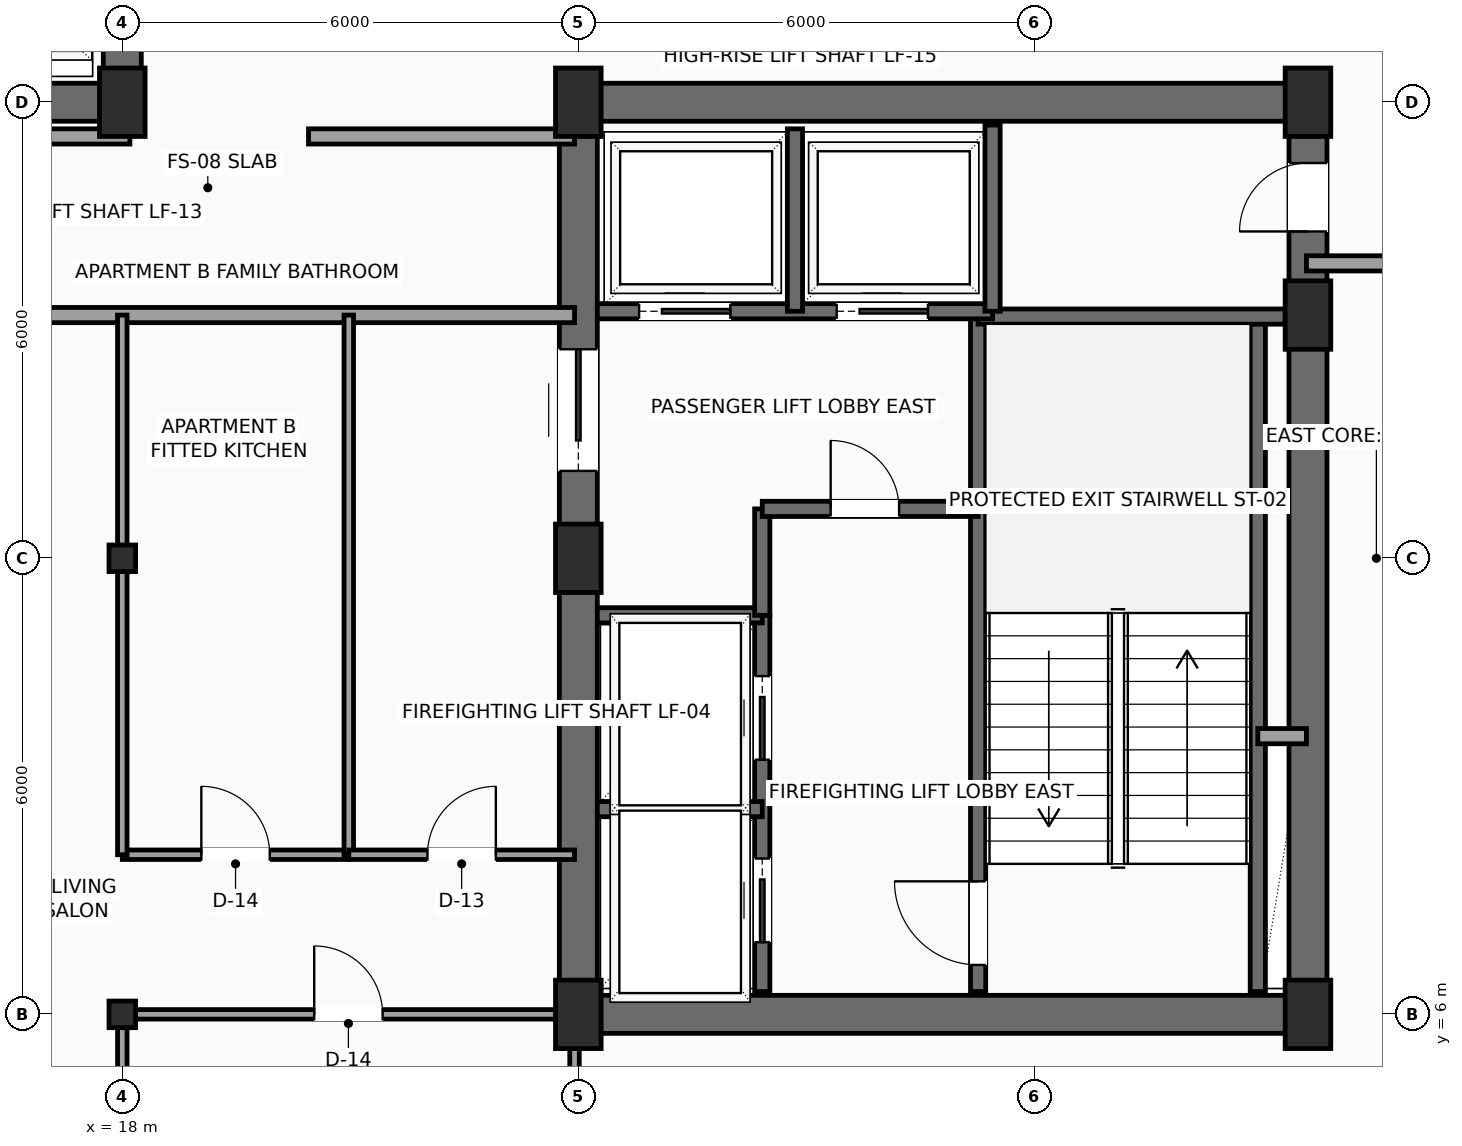
"""IFC4 building model, lengths in metres.
Left out: names, types, materials, properties, quantities, classifications, styles, units other than length and angle.
Written with IfcOpenShell. Run it as: python <this file> out.ifc"""

import sys

from ifc_helpers import new_model, si_unit, direction, frame, frame_2d, origin, origin_2d, place, context, subcontext, project, spatial, rectangle, hollow_rectangle, extrude, element, fill, save


model = new_model("IFC4")
c1 = context("Model", 3, precision=1e-05, world=origin(), true_north=direction((0.0, 1.0)))
c2 = subcontext(c1, "Body", "Model", "MODEL_VIEW")
j1 = project(units=[si_unit("LENGTHUNIT", "METRE"), si_unit("PLANEANGLEUNIT", "RADIAN")], contexts=[c1])
p1 = place(None, origin())
s1 = spatial("IfcSite", under=j1, at=p1, CompositionType="ELEMENT")
p2 = place(p1, origin())
s2 = spatial("IfcBuilding", under=s1, at=p2, CompositionType="ELEMENT")
p3 = place(p2, frame((0.0, 0.0, 257.2)))
s3 = spatial("IfcBuildingStorey", under=s2, at=p3, CompositionType="ELEMENT", Elevation=257.2)
for number, where, z_axis, x_axis in (
    (1, (18.0, 18.0, 0.0), (0.0, 0.0, 1.0), (1.0, 0.0, 0.0)),
    (2, (24.0, 6.0, 0.0), (0.0, 0.0, 1.0), (1.0, 0.0, 0.0)),
    (3, (24.0, 12.0, 0.0), (0.0, 0.0, 1.0), (1.0, 0.0, 0.0)),
    (4, (24.0, 18.0, 0.0), (0.0, 0.0, 1.0), (1.0, 0.0, 0.0)),
    (5, (33.6, 6.0, 0.0), (0.0, 0.0, 1.0), (1.0, 0.0, 0.0)),
    (6, (33.6, 15.2, 0.0), (0.0, 0.0, 1.0), (1.0, 0.0, 0.0)),
    (7, (33.6, 18.0, 0.0), (0.0, 0.0, 1.0), (1.0, 0.0, 0.0)),
):
    element("IfcColumn", number, at=place(p3, frame(where, z_axis=z_axis, x_axis=x_axis)), inside=s3, PredefinedType="COLUMN", context=c2, shape_type="SweptSolid", body=[
        extrude(rectangle(XDim=0.6, YDim=0.9, at=origin_2d()), origin(), (0.0, 0.0, 1.0), 3.5),
    ])
for number, where, z_axis, x_axis in (
    (8, (18.0, 6.0, 0.0), (0.0, 0.0, 1.0), (1.0, 0.0, 0.0)),
    (9, (18.0, 12.0, 0.0), (0.0, 0.0, 1.0), (1.0, 0.0, 0.0)),
):
    element("IfcColumn", number, at=place(p3, frame(where, z_axis=z_axis, x_axis=x_axis)), inside=s3, PredefinedType="COLUMN", context=c2, shape_type="SweptSolid", body=[
        extrude(hollow_rectangle(XDim=0.35, YDim=0.35, WallThickness=0.016, InnerFilletRadius=0.016, OuterFilletRadius=0.032, at=origin_2d()), origin(), (0.0, 0.0, 1.0), 3.5),
    ])
p4 = place(p3, frame((6.0, 18.0, 0.0), z_axis=(0.0, 0.0, 1.0), x_axis=(1.0, 0.0, 0.0)))
e10 = element("IfcWall", 10, at=p4, inside=s3, PredefinedType="SHEAR", context=c2, shape_type="SweptSolid", body=[
    extrude(rectangle(XDim=12.0, YDim=0.5, at=frame_2d((6.0, 0.0))), origin(), (0.0, 0.0, 1.0), 3.3),
])
p5 = place(p4, frame((7.15, 0.0, 0.0)))
e11 = element("IfcOpeningElement", 11, at=p5, cuts=e10, PredefinedType="OPENING", context=c2, shape_type="SweptSolid", body=[
    extrude(rectangle(XDim=1.6, YDim=2.3, at=frame_2d((0.8, 1.15))), frame((0.0, 0.26, 0.0), z_axis=(0.0, -1.0, 0.0), x_axis=(1.0, 0.0, 0.0)), (0.0, 0.0, 1.0), 0.52),
])
for number, where, z_axis, x_axis in (
    (12, (18.0, 18.0, 0.0), (0.0, 0.0, 1.0), (0.0, 1.0, 0.0)),
    (13, (24.0, 6.0, 0.0), (0.0, 0.0, 1.0), (1.0, 0.0, 0.0)),
    (14, (24.0, 18.0, 0.0), (0.0, 0.0, 1.0), (1.0, 0.0, 0.0)),
):
    element("IfcWall", number, at=place(p3, frame(where, z_axis=z_axis, x_axis=x_axis)), inside=s3, PredefinedType="SHEAR", context=c2, shape_type="SweptSolid", body=[
        extrude(rectangle(XDim=9.6, YDim=0.5, at=frame_2d((4.8, 0.0))), origin(), (0.0, 0.0, 1.0), 3.3),
    ])
p6 = place(p3, frame((24.0, 6.0, 0.0), z_axis=(0.0, 0.0, 1.0), x_axis=(0.0, 1.0, 0.0)))
e15 = element("IfcWall", 15, at=p6, inside=s3, PredefinedType="SHEAR", context=c2, shape_type="SweptSolid", body=[
    extrude(rectangle(XDim=12.0, YDim=0.5, at=frame_2d((6.0, 0.0))), origin(), (0.0, 0.0, 1.0), 3.3),
])
p7 = place(p6, frame((7.15, 0.0, 0.0)))
e16 = element("IfcOpeningElement", 16, at=p7, cuts=e15, PredefinedType="OPENING", context=c2, shape_type="SweptSolid", body=[
    extrude(rectangle(XDim=1.6, YDim=2.3, at=frame_2d((0.8, 1.15))), frame((0.0, 0.26, 0.0), z_axis=(0.0, -1.0, 0.0), x_axis=(1.0, 0.0, 0.0)), (0.0, 0.0, 1.0), 0.52),
])
p8 = place(p3, frame((33.6, 6.0, 0.0), z_axis=(0.0, 0.0, 1.0), x_axis=(0.0, 1.0, 0.0)))
e17 = element("IfcWall", 17, at=p8, inside=s3, PredefinedType="SHEAR", context=c2, shape_type="SweptSolid", body=[
    extrude(rectangle(XDim=12.0, YDim=0.5, at=frame_2d((6.0, 0.0))), origin(), (0.0, 0.0, 1.0), 3.3),
])
p9 = place(p8, frame((10.3, 0.0, 0.0)))
e18 = element("IfcOpeningElement", 18, at=p9, cuts=e17, PredefinedType="OPENING", context=c2, shape_type="SweptSolid", body=[
    extrude(rectangle(XDim=0.9, YDim=2.15, at=frame_2d((0.45, 1.075))), frame((0.0, 0.26, 0.0), z_axis=(0.0, -1.0, 0.0), x_axis=(1.0, 0.0, 0.0)), (0.0, 0.0, 1.0), 0.52),
])
p10 = place(p3, frame((29.26, 6.3, 0.0), z_axis=(0.0, 0.0, 1.0), x_axis=(0.0, 1.0, 0.0)))
e19 = element("IfcWall", 19, at=p10, inside=s3, PredefinedType="SHEAR", context=c2, shape_type="SweptSolid", body=[
    extrude(rectangle(XDim=8.88, YDim=0.2, at=frame_2d((4.44, 0.0))), origin(), (0.0, 0.0, 1.0), 3.3),
])
p11 = place(p10, frame((0.35, 0.0, 0.0)))
e20 = element("IfcOpeningElement", 20, at=p11, cuts=e19, PredefinedType="OPENING", context=c2, shape_type="SweptSolid", body=[
    extrude(rectangle(XDim=1.1, YDim=2.2, at=frame_2d((0.55, 1.1))), frame((0.0, 0.11, 0.0), z_axis=(0.0, -1.0, 0.0), x_axis=(1.0, 0.0, 0.0)), (0.0, 0.0, 1.0), 0.22),
])
p12 = place(p3, frame((32.94, 6.3, 0.0), z_axis=(0.0, 0.0, 1.0), x_axis=(0.0, 1.0, 0.0)))
e21 = element("IfcWall", 21, at=p12, inside=s3, PredefinedType="SHEAR", context=c2, shape_type="SweptSolid", body=[
    extrude(rectangle(XDim=8.88, YDim=0.2, at=frame_2d((4.44, 0.0))), origin(), (0.0, 0.0, 1.0), 3.3),
])
p13 = place(p3, frame((29.26, 15.18, 0.0), z_axis=(0.0, 0.0, 1.0), x_axis=(1.0, 0.0, 0.0)))
e22 = element("IfcWall", 22, at=p13, inside=s3, PredefinedType="SHEAR", context=c2, shape_type="SweptSolid", body=[
    extrude(rectangle(XDim=4.04, YDim=0.2, at=frame_2d((2.02, 0.0))), origin(), (0.0, 0.0, 1.0), 3.3),
])
p14 = place(p3, frame((26.42, 6.3, 0.0), z_axis=(0.0, 0.0, 1.0), x_axis=(0.0, 1.0, 0.0)))
e23 = element("IfcWall", 23, at=p14, inside=s3, PredefinedType="SHEAR", context=c2, shape_type="SweptSolid", body=[
    extrude(rectangle(XDim=4.95, YDim=0.2, at=frame_2d((2.475, 0.0))), origin(), (0.0, 0.0, 1.0), 3.3),
])
p15 = place(p14, frame((0.65, 0.0, 0.0)))
e24 = element("IfcOpeningElement", 24, at=p15, cuts=e23, PredefinedType="OPENING", context=c2, shape_type="SweptSolid", body=[
    extrude(rectangle(XDim=1.1, YDim=2.2, at=frame_2d((0.55, 1.1))), frame((0.0, 0.11, 0.0), z_axis=(0.0, -1.0, 0.0), x_axis=(1.0, 0.0, 0.0)), (0.0, 0.0, 1.0), 0.22),
])
p16 = place(p14, frame((3.05, 0.0, 0.0)))
e25 = element("IfcOpeningElement", 25, at=p16, cuts=e23, PredefinedType="OPENING", context=c2, shape_type="SweptSolid", body=[
    extrude(rectangle(XDim=1.1, YDim=2.2, at=frame_2d((0.55, 1.1))), frame((0.0, 0.11, 0.0), z_axis=(0.0, -1.0, 0.0), x_axis=(1.0, 0.0, 0.0)), (0.0, 0.0, 1.0), 0.22),
])
for number, where, z_axis, x_axis in (
    (26, (24.25, 8.7, 0.0), (0.0, 0.0, 1.0), (1.0, 0.0, 0.0)),
    (27, (24.25, 11.25, 0.0), (0.0, 0.0, 1.0), (1.0, 0.0, 0.0)),
):
    element("IfcWall", number, at=place(p3, frame(where, z_axis=z_axis, x_axis=x_axis)), inside=s3, PredefinedType="SHEAR", context=c2, shape_type="SweptSolid", body=[
        extrude(rectangle(XDim=2.17, YDim=0.2, at=frame_2d((1.085, 0.0))), origin(), (0.0, 0.0, 1.0), 3.3),
    ])
p17 = place(p3, frame((26.42, 11.25, 0.0), z_axis=(0.0, 0.0, 1.0), x_axis=(0.0, 1.0, 0.0)))
e28 = element("IfcWall", 28, at=p17, inside=s3, PredefinedType="SHEAR", context=c2, shape_type="SweptSolid", body=[
    extrude(rectangle(XDim=1.4, YDim=0.2, at=frame_2d((0.7, 0.0))), origin(), (0.0, 0.0, 1.0), 3.3),
])
p18 = place(p3, frame((26.42, 12.65, 0.0), z_axis=(0.0, 0.0, 1.0), x_axis=(1.0, 0.0, 0.0)))
e29 = element("IfcWall", 29, at=p18, inside=s3, PredefinedType="SHEAR", context=c2, shape_type="SweptSolid", body=[
    extrude(rectangle(XDim=2.84, YDim=0.2, at=frame_2d((1.42, 0.0))), origin(), (0.0, 0.0, 1.0), 3.3),
])
p19 = place(p18, frame((0.9, 0.0, 0.0)))
e30 = element("IfcOpeningElement", 30, at=p19, cuts=e29, PredefinedType="OPENING", context=c2, shape_type="SweptSolid", body=[
    extrude(rectangle(XDim=0.9, YDim=2.15, at=frame_2d((0.45, 1.075))), frame((0.0, 0.11, 0.0), z_axis=(0.0, -1.0, 0.0), x_axis=(1.0, 0.0, 0.0)), (0.0, 0.0, 1.0), 0.22),
])
p20 = place(p3, frame((32.94, 9.66, 0.0), z_axis=(0.0, 0.0, 1.0), x_axis=(1.0, 0.0, 0.0)))
e31 = element("IfcWall", 31, at=p20, inside=s3, PredefinedType="SOLIDWALL", context=c2, shape_type="SweptSolid", body=[
    extrude(rectangle(XDim=0.64, YDim=0.2, at=frame_2d((0.32, 0.0))), origin(), (0.0, 0.0, 1.0), 3.3),
])
p21 = place(p3, frame((24.25, 15.25, 0.0), z_axis=(0.0, 0.0, 1.0), x_axis=(1.0, 0.0, 0.0)))
e32 = element("IfcWall", 32, at=p21, inside=s3, PredefinedType="SHEAR", context=c2, shape_type="SweptSolid", body=[
    extrude(rectangle(XDim=5.2, YDim=0.2, at=frame_2d((2.6, 0.0))), origin(), (0.0, 0.0, 1.0), 3.3),
])
p22 = place(p21, frame((0.55, 0.0, 0.0)))
e33 = element("IfcOpeningElement", 33, at=p22, cuts=e32, PredefinedType="OPENING", context=c2, shape_type="SweptSolid", body=[
    extrude(rectangle(XDim=1.2, YDim=2.2, at=frame_2d((0.6, 1.1))), frame((0.0, 0.11, 0.0), z_axis=(0.0, -1.0, 0.0), x_axis=(1.0, 0.0, 0.0)), (0.0, 0.0, 1.0), 0.22),
])
p23 = place(p21, frame((3.15, 0.0, 0.0)))
e34 = element("IfcOpeningElement", 34, at=p23, cuts=e32, PredefinedType="OPENING", context=c2, shape_type="SweptSolid", body=[
    extrude(rectangle(XDim=1.2, YDim=2.2, at=frame_2d((0.6, 1.1))), frame((0.0, 0.11, 0.0), z_axis=(0.0, -1.0, 0.0), x_axis=(1.0, 0.0, 0.0)), (0.0, 0.0, 1.0), 0.22),
])
p24 = place(p3, frame((26.85, 15.25, 0.0), z_axis=(0.0, 0.0, 1.0), x_axis=(0.0, 1.0, 0.0)))
e35 = element("IfcWall", 35, at=p24, inside=s3, PredefinedType="SHEAR", context=c2, shape_type="SweptSolid", body=[
    extrude(rectangle(XDim=2.4, YDim=0.2, at=frame_2d((1.2, 0.0))), origin(), (0.0, 0.0, 1.0), 3.3),
])
p25 = place(p3, frame((29.45, 15.25, 0.0), z_axis=(0.0, 0.0, 1.0), x_axis=(0.0, 1.0, 0.0)))
e36 = element("IfcWall", 36, at=p25, inside=s3, PredefinedType="SHEAR", context=c2, shape_type="SweptSolid", body=[
    extrude(rectangle(XDim=2.45, YDim=0.2, at=frame_2d((1.225, 0.0))), origin(), (0.0, 0.0, 1.0), 3.3),
])
p26 = place(p3, frame((14.95, 17.55, 0.0), z_axis=(0.0, 0.0, 1.0), x_axis=(1.0, 0.0, 0.0)))
e37 = element("IfcWall", 37, at=p26, inside=s3, PredefinedType="SOLIDWALL", context=c2, shape_type="SweptSolid", body=[
    extrude(rectangle(XDim=3.15, YDim=0.2, at=frame_2d((1.575, 0.0))), origin(), (0.0, 0.0, 1.0), 3.3),
])
p27 = place(p3, frame((35.7, 15.88, 0.0), z_axis=(0.0, 0.0, 1.0), x_axis=(-1.0, 0.0, 0.0)))
e38 = element("IfcWall", 38, at=p27, inside=s3, PredefinedType="SOLIDWALL", context=c2, shape_type="SweptSolid", body=[
    extrude(rectangle(XDim=2.12, YDim=0.2, at=frame_2d((1.06, 0.0))), origin(), (0.0, 0.0, 1.0), 3.3),
])
p28 = place(p3, frame((20.45, 17.55, 0.0), z_axis=(0.0, 0.0, 1.0), x_axis=(1.0, 0.0, 0.0)))
e39 = element("IfcWall", 39, at=p28, inside=s3, PredefinedType="SOLIDWALL", context=c2, shape_type="SweptSolid", body=[
    extrude(rectangle(XDim=3.5, YDim=0.2, at=frame_2d((1.75, 0.0))), origin(), (0.0, 0.0, 1.0), 3.3),
])
p29 = place(p3, frame((23.95, 15.2, 0.0), z_axis=(0.0, 0.0, 1.0), x_axis=(-1.0, 0.0, 0.0)))
e40 = element("IfcWall", 40, at=p29, inside=s3, PredefinedType="SOLIDWALL", context=c2, shape_type="SweptSolid", body=[
    extrude(rectangle(XDim=9.0, YDim=0.2, at=frame_2d((4.5, 0.0))), origin(), (0.0, 0.0, 1.0), 2.932),
])
p30 = place(p29, frame((6.925, 0.0, 0.0)))
e41 = element("IfcOpeningElement", 41, at=p30, cuts=e40, PredefinedType="OPENING", context=c2, shape_type="SweptSolid", body=[
    extrude(rectangle(XDim=1.0, YDim=2.2, at=frame_2d((0.5, 1.1))), frame((0.0, 0.11, 0.0), z_axis=(0.0, -1.0, 0.0), x_axis=(1.0, 0.0, 0.0)), (0.0, 0.0, 1.0), 0.22),
])
p31 = place(p3, frame((18.0, 8.1, 0.0), z_axis=(0.0, 0.0, 1.0), x_axis=(1.0, 0.0, 0.0)))
e42 = element("IfcWall", 42, at=p31, inside=s3, PredefinedType="PARTITIONING", context=c2, shape_type="SweptSolid", body=[
    extrude(rectangle(XDim=2.98, YDim=0.125, at=frame_2d((1.49, 0.0))), origin(), (0.0, 0.0, 1.0), 3.3),
])
p32 = place(p31, frame((1.04, 0.0, 0.0)))
e43 = element("IfcOpeningElement", 43, at=p32, cuts=e42, PredefinedType="OPENING", context=c2, shape_type="SweptSolid", body=[
    extrude(rectangle(XDim=0.9, YDim=2.1, at=frame_2d((0.45, 1.05))), frame((0.0, 0.073, 0.0), z_axis=(0.0, -1.0, 0.0), x_axis=(1.0, 0.0, 0.0)), (0.0, 0.0, 1.0), 0.145),
])
p33 = place(p3, frame((18.0, 8.1, 0.0), z_axis=(0.0, 0.0, 1.0), x_axis=(0.0, 1.0, 0.0)))
e44 = element("IfcWall", 44, at=p33, inside=s3, PredefinedType="PARTITIONING", context=c2, shape_type="SweptSolid", body=[
    extrude(rectangle(XDim=7.1, YDim=0.125, at=frame_2d((3.55, 0.0))), origin(), (0.0, 0.0, 1.0), 2.992),
])
p34 = place(p3, frame((20.98, 8.1, 0.0), z_axis=(0.0, 0.0, 1.0), x_axis=(0.0, 1.0, 0.0)))
e45 = element("IfcWall", 45, at=p34, inside=s3, PredefinedType="PARTITIONING", context=c2, shape_type="SweptSolid", body=[
    extrude(rectangle(XDim=7.1, YDim=0.125, at=frame_2d((3.55, 0.0))), origin(), (0.0, 0.0, 1.0), 3.3),
])
p35 = place(p3, frame((20.98, 8.1, 0.0), z_axis=(0.0, 0.0, 1.0), x_axis=(1.0, 0.0, 0.0)))
e46 = element("IfcWall", 46, at=p35, inside=s3, PredefinedType="PARTITIONING", context=c2, shape_type="SweptSolid", body=[
    extrude(rectangle(XDim=2.97, YDim=0.125, at=frame_2d((1.485, 0.0))), origin(), (0.0, 0.0, 1.0), 3.3),
])
p36 = place(p35, frame((1.035, 0.0, 0.0)))
e47 = element("IfcOpeningElement", 47, at=p36, cuts=e46, PredefinedType="OPENING", context=c2, shape_type="SweptSolid", body=[
    extrude(rectangle(XDim=0.9, YDim=2.1, at=frame_2d((0.45, 1.05))), frame((0.0, 0.073, 0.0), z_axis=(0.0, -1.0, 0.0), x_axis=(1.0, 0.0, 0.0)), (0.0, 0.0, 1.0), 0.145),
])
p37 = place(p3, frame((18.0, 6.0, 0.0), z_axis=(0.0, 0.0, 1.0), x_axis=(1.0, 0.0, 0.0)))
e48 = element("IfcWall", 48, at=p37, inside=s3, PredefinedType="PARTITIONING", context=c2, shape_type="SweptSolid", body=[
    extrude(rectangle(XDim=5.95, YDim=0.125, at=frame_2d((2.975, 0.0))), origin(), (0.0, 0.0, 1.0), 2.992),
])
p38 = place(p37, frame((2.525, 0.0, 0.0)))
e49 = element("IfcOpeningElement", 49, at=p38, cuts=e48, PredefinedType="OPENING", context=c2, shape_type="SweptSolid", body=[
    extrude(rectangle(XDim=0.9, YDim=2.1, at=frame_2d((0.45, 1.05))), frame((0.0, 0.073, 0.0), z_axis=(0.0, -1.0, 0.0), x_axis=(1.0, 0.0, 0.0)), (0.0, 0.0, 1.0), 0.145),
])
p39 = place(p3, frame((18.0, 0.3, 0.0), z_axis=(0.0, 0.0, 1.0), x_axis=(0.0, 1.0, 0.0)))
e50 = element("IfcWall", 50, at=p39, inside=s3, PredefinedType="PARTITIONING", context=c2, shape_type="SweptSolid", body=[
    extrude(rectangle(XDim=5.7, YDim=0.125, at=frame_2d((2.85, 0.0))), origin(), (0.0, 0.0, 1.0), 2.992),
])
p40 = place(p3, frame((23.95, 0.3, 0.0), z_axis=(0.0, 0.0, 1.0), x_axis=(0.0, 1.0, 0.0)))
e51 = element("IfcWall", 51, at=p40, inside=s3, PredefinedType="PARTITIONING", context=c2, shape_type="SweptSolid", body=[
    extrude(rectangle(XDim=5.7, YDim=0.125, at=frame_2d((2.85, 0.0))), origin(), (0.0, 0.0, 1.0), 2.967),
])
p41 = place(p7, origin())
e52 = element("IfcDoor", 52, at=p41, inside=s3, OperationType="DOUBLE_DOOR_SLIDING", PredefinedType="DOOR", context=c2, shape_type="SweptSolid", body=[
    extrude(rectangle(XDim=1.6, YDim=2.3, at=frame_2d((0.8, 1.15))), frame((0.0, 0.025, 0.0), z_axis=(0.0, -1.0, 0.0), x_axis=(1.0, 0.0, 0.0)), (0.0, 0.0, 1.0), 0.05),
])
fill(e16, e52)
p42 = place(p9, origin())
e53 = element("IfcDoor", 53, at=p42, inside=s3, OperationType="SINGLE_SWING_LEFT", PredefinedType="DOOR", context=c2, shape_type="SweptSolid", body=[
    extrude(rectangle(XDim=0.9, YDim=2.15, at=frame_2d((0.45, 1.075))), frame((0.0, 0.025, 0.0), z_axis=(0.0, -1.0, 0.0), x_axis=(1.0, 0.0, 0.0)), (0.0, 0.0, 1.0), 0.05),
])
fill(e18, e53)
p43 = place(p11, origin())
e54 = element("IfcDoor", 54, at=p43, inside=s3, OperationType="SINGLE_SWING_RIGHT", PredefinedType="DOOR", context=c2, shape_type="SweptSolid", body=[
    extrude(rectangle(XDim=1.1, YDim=2.2, at=frame_2d((0.55, 1.1))), frame((0.0, 0.025, 0.0), z_axis=(0.0, -1.0, 0.0), x_axis=(1.0, 0.0, 0.0)), (0.0, 0.0, 1.0), 0.05),
])
fill(e20, e54)
p44 = place(p15, origin())
e55 = element("IfcDoor", 55, at=p44, inside=s3, OperationType="SLIDING_TO_LEFT", PredefinedType="DOOR", context=c2, shape_type="SweptSolid", body=[
    extrude(rectangle(XDim=1.1, YDim=2.2, at=frame_2d((0.55, 1.1))), frame((0.0, 0.025, 0.0), z_axis=(0.0, -1.0, 0.0), x_axis=(1.0, 0.0, 0.0)), (0.0, 0.0, 1.0), 0.05),
])
fill(e24, e55)
p45 = place(p16, origin())
e56 = element("IfcDoor", 56, at=p45, inside=s3, OperationType="SLIDING_TO_LEFT", PredefinedType="DOOR", context=c2, shape_type="SweptSolid", body=[
    extrude(rectangle(XDim=1.1, YDim=2.2, at=frame_2d((0.55, 1.1))), frame((0.0, 0.025, 0.0), z_axis=(0.0, -1.0, 0.0), x_axis=(1.0, 0.0, 0.0)), (0.0, 0.0, 1.0), 0.05),
])
fill(e25, e56)
p46 = place(p19, origin())
e57 = element("IfcDoor", 57, at=p46, inside=s3, OperationType="SINGLE_SWING_LEFT", PredefinedType="DOOR", context=c2, shape_type="SweptSolid", body=[
    extrude(rectangle(XDim=0.9, YDim=2.15, at=frame_2d((0.45, 1.075))), frame((0.0, 0.025, 0.0), z_axis=(0.0, -1.0, 0.0), x_axis=(1.0, 0.0, 0.0)), (0.0, 0.0, 1.0), 0.05),
])
fill(e30, e57)
p47 = place(p22, origin())
e58 = element("IfcDoor", 58, at=p47, inside=s3, OperationType="SLIDING_TO_RIGHT", PredefinedType="DOOR", context=c2, shape_type="SweptSolid", body=[
    extrude(rectangle(XDim=1.2, YDim=2.2, at=frame_2d((0.6, 1.1))), frame((0.0, 0.025, 0.0), z_axis=(0.0, -1.0, 0.0), x_axis=(1.0, 0.0, 0.0)), (0.0, 0.0, 1.0), 0.05),
])
fill(e33, e58)
p48 = place(p23, origin())
e59 = element("IfcDoor", 59, at=p48, inside=s3, OperationType="SLIDING_TO_RIGHT", PredefinedType="DOOR", context=c2, shape_type="SweptSolid", body=[
    extrude(rectangle(XDim=1.2, YDim=2.2, at=frame_2d((0.6, 1.1))), frame((0.0, 0.025, 0.0), z_axis=(0.0, -1.0, 0.0), x_axis=(1.0, 0.0, 0.0)), (0.0, 0.0, 1.0), 0.05),
])
fill(e34, e59)
p49 = place(p32, origin())
e60 = element("IfcDoor", 60, at=p49, inside=s3, OperationType="SINGLE_SWING_LEFT", PredefinedType="DOOR", context=c2, shape_type="SweptSolid", body=[
    extrude(rectangle(XDim=0.9, YDim=2.1, at=frame_2d((0.45, 1.05))), frame((0.0, 0.025, 0.0), z_axis=(0.0, -1.0, 0.0), x_axis=(1.0, 0.0, 0.0)), (0.0, 0.0, 1.0), 0.05),
])
fill(e43, e60)
p50 = place(p36, origin())
e61 = element("IfcDoor", 61, at=p50, inside=s3, OperationType="SINGLE_SWING_RIGHT", PredefinedType="DOOR", context=c2, shape_type="SweptSolid", body=[
    extrude(rectangle(XDim=0.9, YDim=2.1, at=frame_2d((0.45, 1.05))), frame((0.0, 0.025, 0.0), z_axis=(0.0, -1.0, 0.0), x_axis=(1.0, 0.0, 0.0)), (0.0, 0.0, 1.0), 0.05),
])
fill(e47, e61)
p51 = place(p38, origin())
e62 = element("IfcDoor", 62, at=p51, inside=s3, OperationType="SINGLE_SWING_LEFT", PredefinedType="DOOR", context=c2, shape_type="SweptSolid", body=[
    extrude(rectangle(XDim=0.9, YDim=2.1, at=frame_2d((0.45, 1.05))), frame((0.0, 0.025, 0.0), z_axis=(0.0, -1.0, 0.0), x_axis=(1.0, 0.0, 0.0)), (0.0, 0.0, 1.0), 0.05),
])
fill(e49, e62)
save(model, sys.argv[1])
